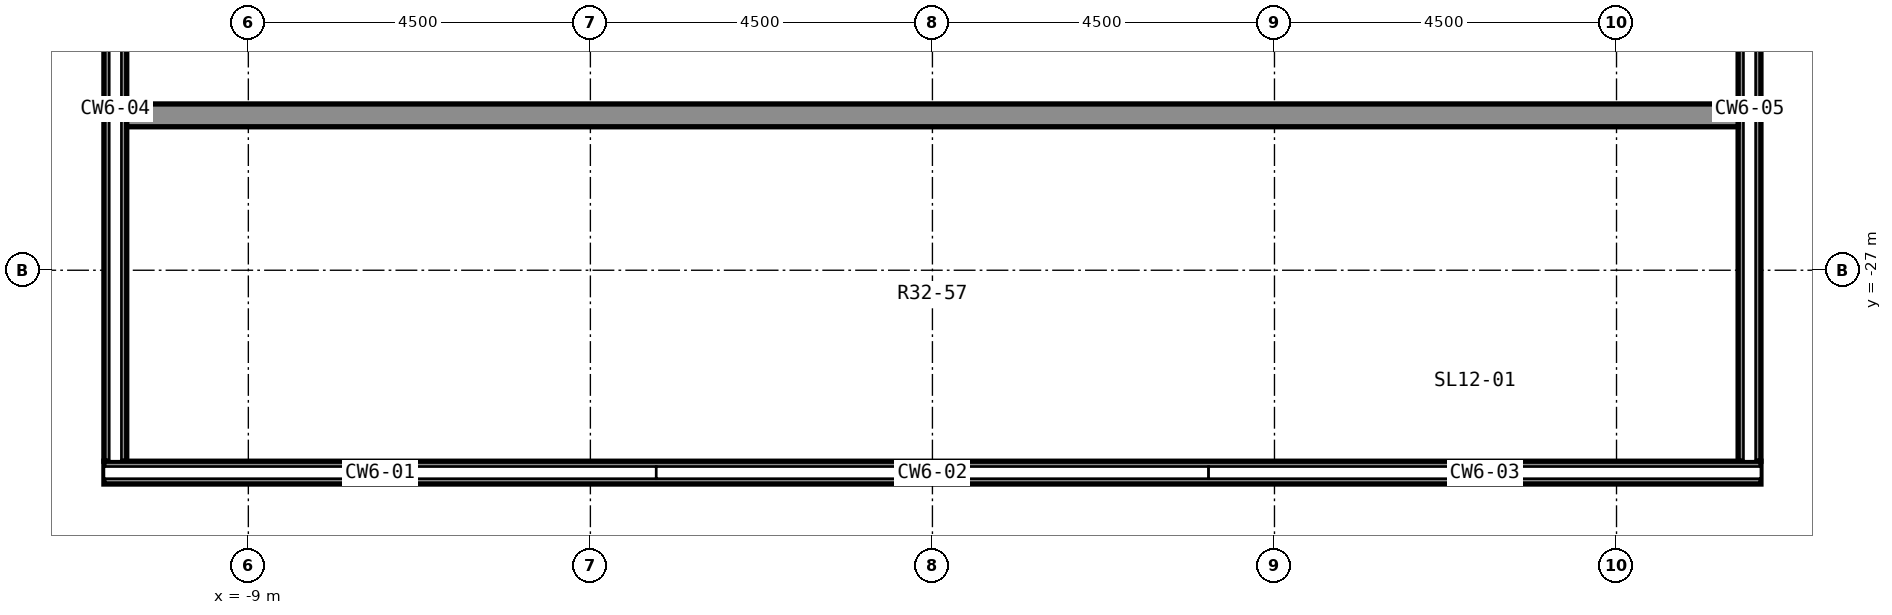
"""IFC4 building model, lengths in metres.
Left out: names, types, materials, properties, quantities, classifications, styles, units other than length and angle.
Written with IfcOpenShell. Run it as: python <this file> out.ifc"""

import sys

from ifc_helpers import new_model, si_unit, direction, frame, frame_2d, origin, place, context, subcontext, project, spatial, rectangle, extrude, element, save


model = new_model("IFC4")
c1 = context("Model", 3, precision=1e-05, world=origin(), true_north=direction((0.0, 1.0)))
c2 = subcontext(c1, "Body", "Model", "MODEL_VIEW")
j1 = project(units=[si_unit("LENGTHUNIT", "METRE"), si_unit("PLANEANGLEUNIT", "RADIAN")], contexts=[c1])
p1 = place(None, origin())
s1 = spatial("IfcSite", under=j1, at=p1, CompositionType="ELEMENT")
p2 = place(p1, origin())
s2 = spatial("IfcBuilding", under=s1, at=p2, CompositionType="ELEMENT")
p3 = place(p2, frame((0.0, 0.0, 224.7)))
s3 = spatial("IfcBuildingStorey", under=s2, at=p3, CompositionType="ELEMENT", Elevation=224.7)
for number, where, z_axis, x_axis in (
    (1, (-10.75, -29.512, 0.0), (0.0, 0.0, 1.0), (0.0, 1.0, 0.0)),
    (2, (10.75, -29.512, 0.0), (0.0, 0.0, 1.0), (0.0, 1.0, 0.0)),
):
    element("IfcWall", number, at=place(p3, frame(where, z_axis=z_axis, x_axis=x_axis)), inside=s3, PredefinedType="SOLIDWALL", context=c2, shape_type="SweptSolid", body=[
        extrude(rectangle(XDim=9.262, YDim=0.3, at=frame_2d((4.631, 0.0))), origin(), (0.0, 0.0, 1.0), 1.7),
    ])
p4 = place(p3, frame((-10.9, -29.663, 0.0), z_axis=(0.0, 0.0, 1.0), x_axis=(1.0, 0.0, 0.0)))
e3 = element("IfcWall", 3, at=p4, inside=s3, PredefinedType="SOLIDWALL", context=c2, shape_type="SweptSolid", body=[
    extrude(rectangle(XDim=21.8, YDim=0.3, at=frame_2d((10.9, 0.0))), origin(), (0.0, 0.0, 1.0), 1.7),
])
p5 = place(p3, frame((-10.6, -24.962, 0.0), z_axis=(0.0, 0.0, 1.0), x_axis=(1.0, 0.0, 0.0)))
e4 = element("IfcWall", 4, at=p5, inside=s3, PredefinedType="SOLIDWALL", context=c2, shape_type="SweptSolid", body=[
    extrude(rectangle(XDim=21.2, YDim=0.3, at=frame_2d((10.6, 0.0))), origin(), (0.0, 0.0, 1.0), 1.7),
])
save(model, sys.argv[1])
